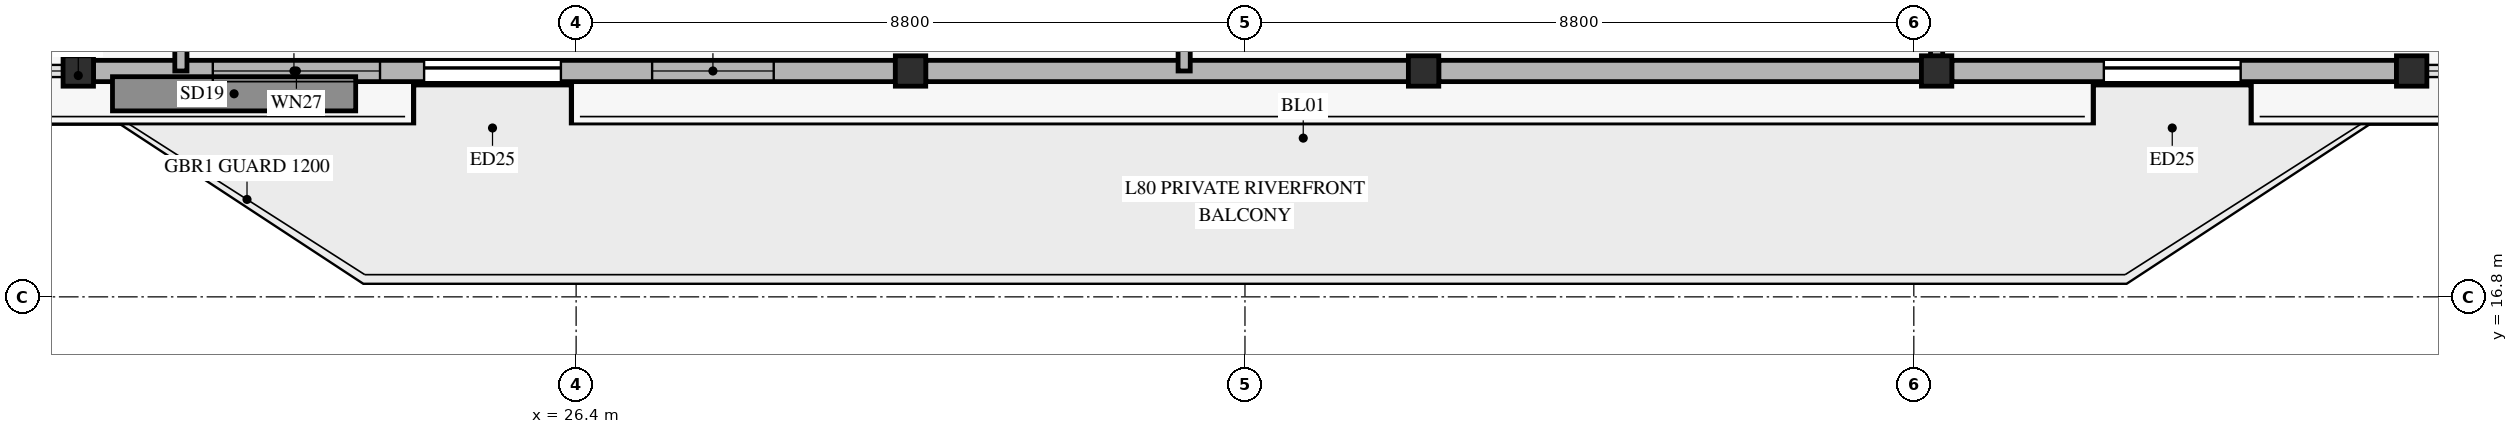
"""IFC4 building model, lengths in metres.
Left out: names, types, materials, properties, quantities, classifications, styles, units other than length and angle.
Written with IfcOpenShell. Run it as: python <this file> out.ifc"""

import sys

from ifc_helpers import new_model, si_unit, direction, frame, frame_2d, origin, origin_2d, place, context, subcontext, project, spatial, rectangle, hollow_rectangle, extrude, source, transform, mapped, element, fill, save


model = new_model("IFC4")
c1 = context("Model", 3, precision=1e-05, world=origin(), true_north=direction((0.0, 1.0)))
c2 = subcontext(c1, "Body", "Model", "MODEL_VIEW")
j1 = project(units=[si_unit("LENGTHUNIT", "METRE"), si_unit("PLANEANGLEUNIT", "RADIAN")], contexts=[c1])
p1 = place(None, origin())
s1 = spatial("IfcSite", under=j1, at=p1, CompositionType="ELEMENT")
p2 = place(p1, origin())
s2 = spatial("IfcBuilding", under=s1, at=p2, CompositionType="ELEMENT")
p3 = place(p2, frame((0.0, 0.0, 310.8)))
s3 = spatial("IfcBuildingStorey", under=s2, at=p3, CompositionType="ELEMENT", Elevation=310.8)
m1 = source(origin(), c2, "Body", "SweptSolid", [
    extrude(hollow_rectangle(XDim=0.4, YDim=0.4, WallThickness=0.02, at=origin_2d()), origin(), (0.0, 0.0, 1.0), 3.319),
])
for number, where, z_axis, x_axis in (
    (1, (19.85, 19.772, 0.0), (0.0, 0.281, 0.96), (-1.0, 0.0, 0.0)),
    (2, (30.8, 19.772, 0.0), (0.0, 0.281, 0.96), (-1.0, 0.0, 0.0)),
    (3, (37.55, 19.772, 0.0), (0.0, 0.281, 0.96), (-1.0, 0.0, 0.0)),
    (4, (44.3, 19.772, 0.0), (0.0, 0.281, 0.96), (-1.0, 0.0, 0.0)),
    (5, (50.55, 19.772, 0.0), (0.0, 0.281, 0.96), (-1.0, 0.0, 0.0)),
):
    element("IfcColumn", number, at=place(p3, frame(where, z_axis=z_axis, x_axis=x_axis)), inside=s3, PredefinedType="COLUMN", context=c2, shape_type="MappedRepresentation", body=[
        mapped(m1, transform((0.0, 0.0, 0.0), x_axis=(1.0, 0.0, 0.0), y_axis=(0.0, 1.0, 0.0), z_axis=(0.0, 0.0, 1.0), scale=1.0)),
    ])
p4 = place(p3, frame((20.05, 19.772, 0.0), z_axis=(0.0, 0.0, 1.0), x_axis=(1.0, 0.0, 0.0)))
e6 = element("IfcWall", 6, at=p4, inside=s3, PredefinedType="SOLIDWALL", context=c2, shape_type="SweptSolid", body=[
    extrude(rectangle(XDim=10.55, YDim=0.28, at=frame_2d((5.275, 0.0))), origin(), (0.0, 0.0, 1.0), 2.815),
])
p5 = place(p4, frame((4.35, 0.0, 0.0)))
e7 = element("IfcOpeningElement", 7, at=p5, cuts=e6, PredefinedType="OPENING", context=c2, shape_type="SweptSolid", body=[
    extrude(rectangle(XDim=1.8, YDim=2.25, at=frame_2d((0.9, 1.125))), frame((0.0, 0.15, 0.0), z_axis=(0.0, -1.0, 0.0), x_axis=(1.0, 0.0, 0.0)), (0.0, 0.0, 1.0), 0.3),
])
p6 = place(p4, frame((1.57, 0.0, 0.45)))
e8 = element("IfcOpeningElement", 8, at=p6, cuts=e6, PredefinedType="OPENING", context=c2, shape_type="SweptSolid", body=[
    extrude(rectangle(XDim=2.2, YDim=2.1, at=frame_2d((1.1, 1.05))), frame((0.0, 0.15, 0.0), z_axis=(0.0, -1.0, 0.0), x_axis=(1.0, 0.0, 0.0)), (0.0, 0.0, 1.0), 0.3),
])
p7 = place(p4, frame((7.35, 0.0, 0.45)))
e9 = element("IfcOpeningElement", 9, at=p7, cuts=e6, PredefinedType="OPENING", context=c2, shape_type="SweptSolid", body=[
    extrude(rectangle(XDim=1.6, YDim=2.0, at=frame_2d((0.8, 1.0))), frame((0.0, 0.15, 0.0), z_axis=(0.0, -1.0, 0.0), x_axis=(1.0, 0.0, 0.0)), (0.0, 0.0, 1.0), 0.3),
])
for number, where, z_axis, x_axis in (
    (10, (31.0, 19.772, 0.0), (0.0, 0.0, 1.0), (1.0, 0.0, 0.0)),
    (11, (37.75, 19.772, 0.0), (0.0, 0.0, 1.0), (1.0, 0.0, 0.0)),
):
    element("IfcWall", number, at=place(p3, frame(where, z_axis=z_axis, x_axis=x_axis)), inside=s3, PredefinedType="SOLIDWALL", context=c2, shape_type="SweptSolid", body=[
        extrude(rectangle(XDim=6.35, YDim=0.28, at=frame_2d((3.175, 0.0))), origin(), (0.0, 0.0, 1.0), 2.815),
    ])
p8 = place(p3, frame((44.5, 19.772, 0.0), z_axis=(0.0, 0.0, 1.0), x_axis=(1.0, 0.0, 0.0)))
e12 = element("IfcWall", 12, at=p8, inside=s3, PredefinedType="SOLIDWALL", context=c2, shape_type="SweptSolid", body=[
    extrude(rectangle(XDim=5.85, YDim=0.28, at=frame_2d((2.925, 0.0))), origin(), (0.0, 0.0, 1.0), 2.815),
])
p9 = place(p8, frame((2.0, 0.0, 0.0)))
e13 = element("IfcOpeningElement", 13, at=p9, cuts=e12, PredefinedType="OPENING", context=c2, shape_type="SweptSolid", body=[
    extrude(rectangle(XDim=1.8, YDim=2.25, at=frame_2d((0.9, 1.125))), frame((0.0, 0.15, 0.0), z_axis=(0.0, -1.0, 0.0), x_axis=(1.0, 0.0, 0.0)), (0.0, 0.0, 1.0), 0.3),
])
p10 = place(p3, frame((21.2, 19.772, 0.0), z_axis=(0.0, 0.0, 1.0), x_axis=(0.0, 1.0, 0.0)))
e14 = element("IfcWall", 14, at=p10, inside=s3, PredefinedType="PARTITIONING", context=c2, shape_type="SweptSolid", body=[
    extrude(rectangle(XDim=17.678, YDim=0.16, at=frame_2d((8.839, 0.0))), origin(), (0.0, 0.0, 1.0), 2.77),
])
p11 = place(p10, frame((15.348, 0.0, 0.0)))
e15 = element("IfcOpeningElement", 15, at=p11, cuts=e14, PredefinedType="OPENING", context=c2, shape_type="SweptSolid", body=[
    extrude(rectangle(XDim=1.05, YDim=2.15, at=frame_2d((0.525, 1.075))), frame((0.0, 0.09, 0.0), z_axis=(0.0, -1.0, 0.0), x_axis=(1.0, 0.0, 0.0)), (0.0, 0.0, 1.0), 0.18),
])
p12 = place(p3, frame((34.4, 19.772, 0.0), z_axis=(0.0, 0.0, 1.0), x_axis=(0.0, 1.0, 0.0)))
e16 = element("IfcWall", 16, at=p12, inside=s3, PredefinedType="PARTITIONING", context=c2, shape_type="SweptSolid", body=[
    extrude(rectangle(XDim=14.928, YDim=0.16, at=frame_2d((7.464, 0.0))), origin(), (0.0, 0.0, 1.0), 2.77),
])
p13 = place(p3, frame((44.3, 19.772, 0.0), z_axis=(0.0, 0.0, 1.0), x_axis=(0.0, 1.0, 0.0)))
e17 = element("IfcWall", 17, at=p13, inside=s3, PredefinedType="PARTITIONING", context=c2, shape_type="SweptSolid", body=[
    extrude(rectangle(XDim=17.678, YDim=0.16, at=frame_2d((8.839, 0.0))), origin(), (0.0, 0.0, 1.0), 2.47),
])
p14 = place(p13, frame((15.348, 0.0, 0.0)))
e18 = element("IfcOpeningElement", 18, at=p14, cuts=e17, PredefinedType="OPENING", context=c2, shape_type="SweptSolid", body=[
    extrude(rectangle(XDim=1.05, YDim=2.15, at=frame_2d((0.525, 1.075))), frame((0.0, 0.09, 0.0), z_axis=(0.0, -1.0, 0.0), x_axis=(1.0, 0.0, 0.0)), (0.0, 0.0, 1.0), 0.18),
])
m2 = source(origin(), c2, "Body", "SweptSolid", [
    extrude(rectangle(XDim=1.8, YDim=2.25, at=frame_2d((0.9, 1.125))), frame((0.0, 0.025, 0.0), z_axis=(0.0, -1.0, 0.0), x_axis=(1.0, 0.0, 0.0)), (0.0, 0.0, 1.0), 0.05),
])
p15 = place(p5, origin())
e19 = element("IfcDoor", 19, at=p15, inside=s3, OperationType="SLIDING_TO_LEFT", PredefinedType="DOOR", context=c2, shape_type="MappedRepresentation", body=[
    mapped(m2, transform((0.0, 0.0, 0.0), x_axis=(1.0, 0.0, 0.0), y_axis=(0.0, 1.0, 0.0), z_axis=(0.0, 0.0, 1.0), scale=1.0)),
])
fill(e7, e19)
m3 = source(origin(), c2, "Body", "SweptSolid", [
    extrude(rectangle(XDim=2.2, YDim=2.1, at=frame_2d((1.1, 1.05))), frame((0.0, 0.03, 0.0), z_axis=(0.0, -1.0, 0.0), x_axis=(1.0, 0.0, 0.0)), (0.0, 0.0, 1.0), 0.06),
])
p16 = place(p6, origin())
e20 = element("IfcWindow", 20, at=p16, inside=s3, PartitioningType="SINGLE_PANEL", PredefinedType="WINDOW", context=c2, shape_type="MappedRepresentation", body=[
    mapped(m3, transform((0.0, 0.0, 0.0), x_axis=(1.0, 0.0, 0.0), y_axis=(0.0, 1.0, 0.0), z_axis=(0.0, 0.0, 1.0), scale=1.0)),
])
fill(e8, e20)
m4 = source(origin(), c2, "Body", "SweptSolid", [
    extrude(rectangle(XDim=1.6, YDim=2.0, at=frame_2d((0.8, 1.0))), frame((0.0, 0.03, 0.0), z_axis=(0.0, -1.0, 0.0), x_axis=(1.0, 0.0, 0.0)), (0.0, 0.0, 1.0), 0.06),
])
p17 = place(p7, origin())
e21 = element("IfcWindow", 21, at=p17, inside=s3, PartitioningType="SINGLE_PANEL", PredefinedType="WINDOW", context=c2, shape_type="MappedRepresentation", body=[
    mapped(m4, transform((0.0, 0.0, 0.0), x_axis=(1.0, 0.0, 0.0), y_axis=(0.0, 1.0, 0.0), z_axis=(0.0, 0.0, 1.0), scale=1.0)),
])
fill(e9, e21)
p18 = place(p9, origin())
e22 = element("IfcDoor", 22, at=p18, inside=s3, OperationType="SLIDING_TO_LEFT", PredefinedType="DOOR", context=c2, shape_type="MappedRepresentation", body=[
    mapped(m2, transform((0.0, 0.0, 0.0), x_axis=(1.0, 0.0, 0.0), y_axis=(0.0, 1.0, 0.0), z_axis=(0.0, 0.0, 1.0), scale=1.0)),
])
fill(e13, e22)
save(model, sys.argv[1])
